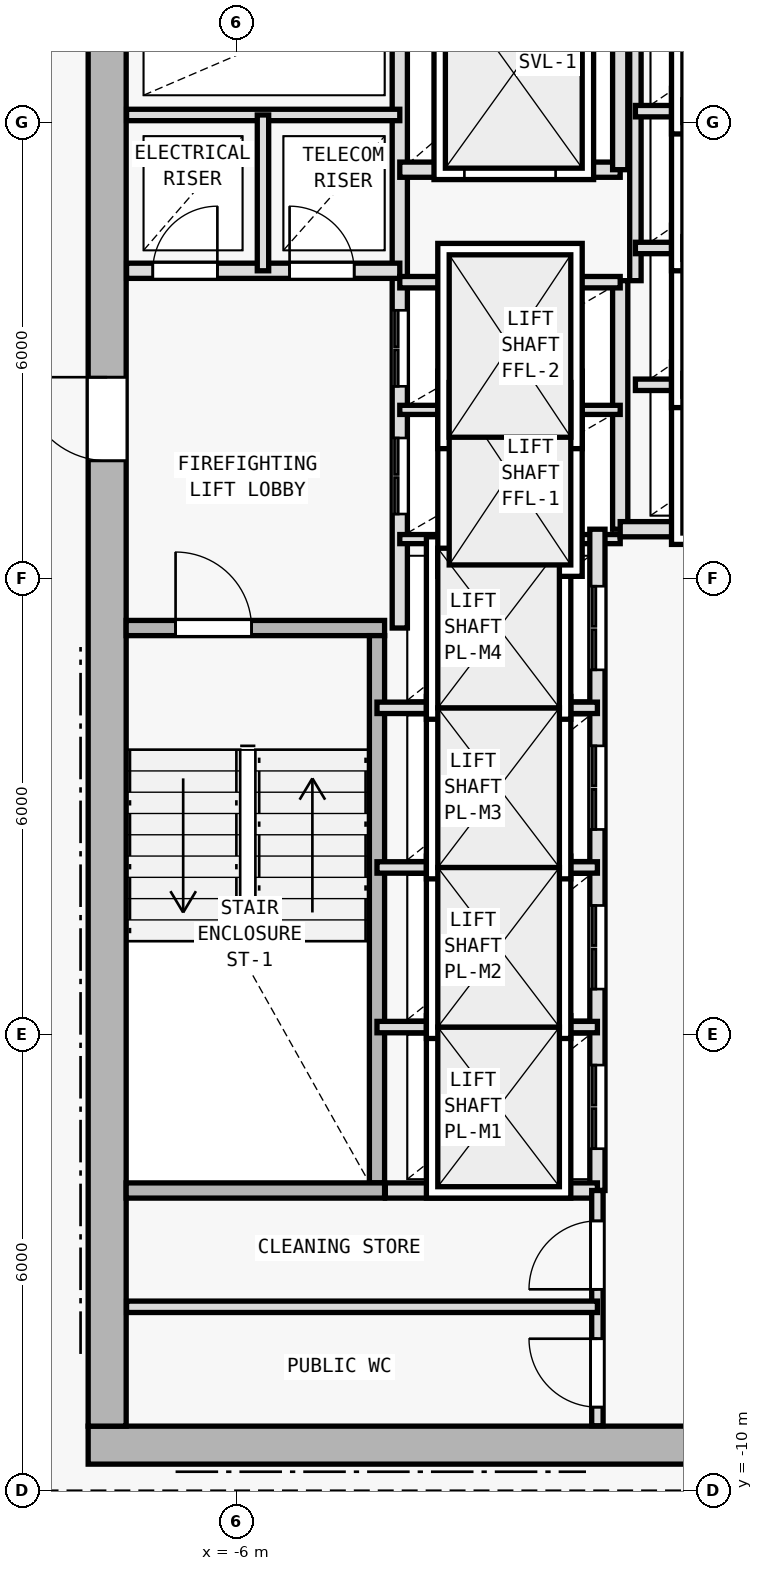
"""IFC4 building model, lengths in metres.
Left out: names, types, materials, properties, quantities, classifications, styles, units other than length and angle.
Written with IfcOpenShell. Run it as: python <this file> out.ifc"""

import sys

from ifc_helpers import new_model, si_unit, direction, frame, frame_2d, origin, origin_2d, place, context, subcontext, project, spatial, rectangle, i_section, extrude, element, fill, save


model = new_model("IFC4")
c1 = context("Model", 3, precision=1e-05, world=origin(), true_north=direction((0.0, 1.0)))
c2 = subcontext(c1, "Body", "Model", "MODEL_VIEW")
j1 = project(units=[si_unit("LENGTHUNIT", "METRE"), si_unit("PLANEANGLEUNIT", "RADIAN")], contexts=[c1])
p1 = place(None, origin())
s1 = spatial("IfcSite", under=j1, at=p1, CompositionType="ELEMENT")
p2 = place(p1, origin())
s2 = spatial("IfcBuilding", under=s1, at=p2, CompositionType="ELEMENT")
p3 = place(p2, frame((0.0, 0.0, 205.5)))
s3 = spatial("IfcBuildingStorey", under=s2, at=p3, CompositionType="ELEMENT", Elevation=205.5)
for number, where, z_axis, x_axis in (
    (1, (-7.7, -9.4, 0.0), (0.0, 0.0, 1.0), (1.0, 0.0, 0.0)),
    (2, (0.0, -9.4, 0.0), (0.0, 0.0, 1.0), (1.0, 0.0, 0.0)),
    (3, (-7.7, 2.0, 0.0), (0.0, 0.0, 1.0), (1.0, 0.0, 0.0)),
):
    element("IfcColumn", number, at=place(p3, frame(where, z_axis=z_axis, x_axis=x_axis)), inside=s3, PredefinedType="COLUMN", context=c2, shape_type="SweptSolid", body=[
        extrude(i_section(OverallWidth=0.398, OverallDepth=0.387, WebThickness=0.013, FlangeThickness=0.022, FilletRadius=0.015, at=origin_2d()), origin(), (0.0, 0.0, 1.0), 3.6),
    ])
p4 = place(p3, frame((-7.95, -9.4, 0.0), z_axis=(0.0, 0.0, 1.0), x_axis=(1.0, 0.0, 0.0)))
e4 = element("IfcWall", 4, at=p4, inside=s3, PredefinedType="SHEAR", context=c2, shape_type="SweptSolid", body=[
    extrude(rectangle(XDim=15.9, YDim=0.5, at=frame_2d((7.95, 0.0))), origin(), (0.0, 0.0, 1.0), 3.35),
])
p5 = place(p4, frame((9.6, 0.0, 0.0)))
e5 = element("IfcOpeningElement", 5, at=p5, cuts=e4, PredefinedType="OPENING", context=c2, shape_type="SweptSolid", body=[
    extrude(rectangle(XDim=1.5, YDim=2.2, at=frame_2d((0.75, 1.1))), frame((0.0, 0.26, 0.0), z_axis=(0.0, -1.0, 0.0), x_axis=(1.0, 0.0, 0.0)), (0.0, 0.0, 1.0), 0.52),
])
p6 = place(p3, frame((-7.7, -9.15, 0.0), z_axis=(0.0, 0.0, 1.0), x_axis=(0.0, 1.0, 0.0)))
e6 = element("IfcWall", 6, at=p6, inside=s3, PredefinedType="SHEAR", context=c2, shape_type="SweptSolid", body=[
    extrude(rectangle(XDim=19.1, YDim=0.5, at=frame_2d((9.55, 0.0))), origin(), (0.0, 0.0, 1.0), 3.35),
])
p7 = place(p6, frame((12.7, 0.0, 0.0)))
e7 = element("IfcOpeningElement", 7, at=p7, cuts=e6, PredefinedType="OPENING", context=c2, shape_type="SweptSolid", body=[
    extrude(rectangle(XDim=1.1, YDim=2.15, at=frame_2d((0.55, 1.075))), frame((0.0, 0.26, 0.0), z_axis=(0.0, -1.0, 0.0), x_axis=(1.0, 0.0, 0.0)), (0.0, 0.0, 1.0), 0.52),
])
p8 = place(p3, frame((-7.45, 1.35, 0.0), z_axis=(0.0, 0.0, 1.0), x_axis=(1.0, 0.0, 0.0)))
e8 = element("IfcWall", 8, at=p8, inside=s3, PredefinedType="SOLIDWALL", context=c2, shape_type="SweptSolid", body=[
    extrude(rectangle(XDim=3.4, YDim=0.2, at=frame_2d((1.7, 0.0))), origin(), (0.0, 0.0, 1.0), 3.35),
])
p9 = place(p8, frame((0.65, 0.0, 0.0)))
e9 = element("IfcOpeningElement", 9, at=p9, cuts=e8, PredefinedType="OPENING", context=c2, shape_type="SweptSolid", body=[
    extrude(rectangle(XDim=1.0, YDim=2.15, at=frame_2d((0.5, 1.075))), frame((0.0, 0.11, 0.0), z_axis=(0.0, -1.0, 0.0), x_axis=(1.0, 0.0, 0.0)), (0.0, 0.0, 1.0), 0.22),
])
p10 = place(p3, frame((-4.15, -5.95, 0.0), z_axis=(0.0, 0.0, 1.0), x_axis=(0.0, 1.0, 0.0)))
e10 = element("IfcWall", 10, at=p10, inside=s3, PredefinedType="SOLIDWALL", context=c2, shape_type="SweptSolid", body=[
    extrude(rectangle(XDim=7.2, YDim=0.2, at=frame_2d((3.6, 0.0))), origin(), (0.0, 0.0, 1.0), 3.35),
])
p11 = place(p3, frame((-3.85, 1.35, 0.0), z_axis=(0.0, 0.0, 1.0), x_axis=(0.0, 1.0, 0.0)))
e11 = element("IfcWall", 11, at=p11, inside=s3, PredefinedType="SOLIDWALL", context=c2, shape_type="SweptSolid", body=[
    extrude(rectangle(XDim=8.595, YDim=0.2, at=frame_2d((4.297, 0.0))), origin(), (0.0, 0.0, 1.0), 3.35),
])
p12 = place(p11, frame((1.5, 0.0, 0.0)))
e12 = element("IfcOpeningElement", 12, at=p12, cuts=e11, PredefinedType="OPENING", context=c2, shape_type="SweptSolid", body=[
    extrude(rectangle(XDim=1.0, YDim=2.15, at=frame_2d((0.5, 1.075))), frame((0.0, 0.11, 0.0), z_axis=(0.0, -1.0, 0.0), x_axis=(1.0, 0.0, 0.0)), (0.0, 0.0, 1.0), 0.22),
])
p13 = place(p11, frame((3.18, 0.0, 0.0)))
e13 = element("IfcOpeningElement", 13, at=p13, cuts=e11, PredefinedType="OPENING", context=c2, shape_type="SweptSolid", body=[
    extrude(rectangle(XDim=1.0, YDim=2.15, at=frame_2d((0.5, 1.075))), frame((0.0, 0.11, 0.0), z_axis=(0.0, -1.0, 0.0), x_axis=(1.0, 0.0, 0.0)), (0.0, 0.0, 1.0), 0.22),
])
p14 = place(p3, frame((-7.445, 6.05, 0.0), z_axis=(0.0, 0.0, 1.0), x_axis=(1.0, 0.0, 0.0)))
e14 = element("IfcWall", 14, at=p14, inside=s3, PredefinedType="SOLIDWALL", context=c2, shape_type="SweptSolid", body=[
    extrude(rectangle(XDim=3.595, YDim=0.2, at=frame_2d((1.797, 0.0))), origin(), (0.0, 0.0, 1.0), 3.35),
])
p15 = place(p14, frame((0.345, 0.0, 0.0)))
e15 = element("IfcOpeningElement", 15, at=p15, cuts=e14, PredefinedType="OPENING", context=c2, shape_type="SweptSolid", body=[
    extrude(rectangle(XDim=0.85, YDim=2.1, at=frame_2d((0.425, 1.05))), frame((0.0, 0.11, 0.0), z_axis=(0.0, -1.0, 0.0), x_axis=(1.0, 0.0, 0.0)), (0.0, 0.0, 1.0), 0.22),
])
p16 = place(p14, frame((2.145, 0.0, 0.0)))
e16 = element("IfcOpeningElement", 16, at=p16, cuts=e14, PredefinedType="OPENING", context=c2, shape_type="SweptSolid", body=[
    extrude(rectangle(XDim=0.85, YDim=2.1, at=frame_2d((0.425, 1.05))), frame((0.0, 0.11, 0.0), z_axis=(0.0, -1.0, 0.0), x_axis=(1.0, 0.0, 0.0)), (0.0, 0.0, 1.0), 0.22),
])
p17 = place(p3, frame((-7.445, 8.1, 0.0), z_axis=(0.0, 0.0, 1.0), x_axis=(1.0, 0.0, 0.0)))
e17 = element("IfcWall", 17, at=p17, inside=s3, PredefinedType="PARTITIONING", context=c2, shape_type="SweptSolid", body=[
    extrude(rectangle(XDim=3.595, YDim=0.15, at=frame_2d((1.797, 0.0))), origin(), (0.0, 0.0, 1.0), 3.35),
])
p18 = place(p3, frame((-5.65, 6.05, 0.0), z_axis=(0.0, 0.0, 1.0), x_axis=(0.0, 1.0, 0.0)))
e18 = element("IfcWall", 18, at=p18, inside=s3, PredefinedType="PARTITIONING", context=c2, shape_type="SweptSolid", body=[
    extrude(rectangle(XDim=2.05, YDim=0.15, at=frame_2d((1.025, 0.0))), origin(), (0.0, 0.0, 1.0), 3.35),
])
p19 = place(p3, frame((-0.95, 2.65, 0.0), z_axis=(0.0, 0.0, 1.0), x_axis=(0.0, 1.0, 0.0)))
e19 = element("IfcWall", 19, at=p19, inside=s3, PredefinedType="SOLIDWALL", context=c2, shape_type="SweptSolid", body=[
    extrude(rectangle(XDim=3.27, YDim=0.2, at=frame_2d((1.635, 0.0))), origin(), (0.0, 0.0, 1.0), 3.35),
])
for number, where, z_axis, x_axis in (
    (20, (-3.85, 2.52, 0.0), (0.0, 0.0, 1.0), (1.0, 0.0, 0.0)),
    (21, (-3.85, 4.22, 0.0), (0.0, 0.0, 1.0), (1.0, 0.0, 0.0)),
):
    element("IfcWall", number, at=place(p3, frame(where, z_axis=z_axis, x_axis=x_axis)), inside=s3, PredefinedType="PARTITIONING", context=c2, shape_type="SweptSolid", body=[
        extrude(rectangle(XDim=2.9, YDim=0.12, at=frame_2d((1.45, 0.0))), origin(), (0.0, 0.0, 1.0), 3.35),
    ])
p20 = place(p3, frame((-3.85, 5.9, 0.0), z_axis=(0.0, 0.0, 1.0), x_axis=(1.0, 0.0, 0.0)))
e22 = element("IfcWall", 22, at=p20, inside=s3, PredefinedType="PARTITIONING", context=c2, shape_type="SweptSolid", body=[
    extrude(rectangle(XDim=2.9, YDim=0.15, at=frame_2d((1.45, 0.0))), origin(), (0.0, 0.0, 1.0), 3.35),
])
p21 = place(p3, frame((-3.85, 7.38, 0.0), z_axis=(0.0, 0.0, 1.0), x_axis=(1.0, 0.0, 0.0)))
e23 = element("IfcWall", 23, at=p21, inside=s3, PredefinedType="SOLIDWALL", context=c2, shape_type="SweptSolid", body=[
    extrude(rectangle(XDim=2.9, YDim=0.2, at=frame_2d((1.45, 0.0))), origin(), (0.0, 0.0, 1.0), 3.35),
])
p22 = place(p21, frame((0.85, 0.0, 0.0)))
e24 = element("IfcOpeningElement", 24, at=p22, cuts=e23, PredefinedType="OPENING", context=c2, shape_type="SweptSolid", body=[
    extrude(rectangle(XDim=1.2, YDim=2.2, at=frame_2d((0.6, 1.1))), frame((0.0, 0.11, 0.0), z_axis=(0.0, -1.0, 0.0), x_axis=(1.0, 0.0, 0.0)), (0.0, 0.0, 1.0), 0.22),
])
p23 = place(p3, frame((-0.95, 7.38, 0.0), z_axis=(0.0, 0.0, 1.0), x_axis=(0.0, 1.0, 0.0)))
e25 = element("IfcWall", 25, at=p23, inside=s3, PredefinedType="SOLIDWALL", context=c2, shape_type="SweptSolid", body=[
    extrude(rectangle(XDim=2.565, YDim=0.2, at=frame_2d((1.283, 0.0))), origin(), (0.0, 0.0, 1.0), 3.35),
])
p24 = place(p3, frame((-1.25, -6.05, 0.0), z_axis=(0.0, 0.0, 1.0), x_axis=(0.0, 1.0, 0.0)))
e26 = element("IfcWall", 26, at=p24, inside=s3, PredefinedType="SOLIDWALL", context=c2, shape_type="SweptSolid", body=[
    extrude(rectangle(XDim=8.7, YDim=0.2, at=frame_2d((4.35, 0.0))), origin(), (0.0, 0.0, 1.0), 3.35),
])
p25 = place(p24, frame((0.55, 0.0, 0.0)))
e27 = element("IfcOpeningElement", 27, at=p25, cuts=e26, PredefinedType="OPENING", context=c2, shape_type="SweptSolid", body=[
    extrude(rectangle(XDim=1.1, YDim=2.15, at=frame_2d((0.55, 1.075))), frame((0.0, 0.11, 0.0), z_axis=(0.0, -1.0, 0.0), x_axis=(1.0, 0.0, 0.0)), (0.0, 0.0, 1.0), 0.22),
])
p26 = place(p24, frame((2.65, 0.0, 0.0)))
e28 = element("IfcOpeningElement", 28, at=p26, cuts=e26, PredefinedType="OPENING", context=c2, shape_type="SweptSolid", body=[
    extrude(rectangle(XDim=1.1, YDim=2.15, at=frame_2d((0.55, 1.075))), frame((0.0, 0.11, 0.0), z_axis=(0.0, -1.0, 0.0), x_axis=(1.0, 0.0, 0.0)), (0.0, 0.0, 1.0), 0.22),
])
p27 = place(p24, frame((4.75, 0.0, 0.0)))
e29 = element("IfcOpeningElement", 29, at=p27, cuts=e26, PredefinedType="OPENING", context=c2, shape_type="SweptSolid", body=[
    extrude(rectangle(XDim=1.1, YDim=2.15, at=frame_2d((0.55, 1.075))), frame((0.0, 0.11, 0.0), z_axis=(0.0, -1.0, 0.0), x_axis=(1.0, 0.0, 0.0)), (0.0, 0.0, 1.0), 0.22),
])
p28 = place(p24, frame((6.85, 0.0, 0.0)))
e30 = element("IfcOpeningElement", 30, at=p28, cuts=e26, PredefinedType="OPENING", context=c2, shape_type="SweptSolid", body=[
    extrude(rectangle(XDim=1.1, YDim=2.15, at=frame_2d((0.55, 1.075))), frame((0.0, 0.11, 0.0), z_axis=(0.0, -1.0, 0.0), x_axis=(1.0, 0.0, 0.0)), (0.0, 0.0, 1.0), 0.22),
])
for number, where, z_axis, x_axis in (
    (31, (-4.15, -3.9, 0.0), (0.0, 0.0, 1.0), (1.0, 0.0, 0.0)),
    (32, (-4.15, -1.8, 0.0), (0.0, 0.0, 1.0), (1.0, 0.0, 0.0)),
    (33, (-4.15, 0.3, 0.0), (0.0, 0.0, 1.0), (1.0, 0.0, 0.0)),
):
    element("IfcWall", number, at=place(p3, frame(where, z_axis=z_axis, x_axis=x_axis)), inside=s3, PredefinedType="PARTITIONING", context=c2, shape_type="SweptSolid", body=[
        extrude(rectangle(XDim=2.9, YDim=0.15, at=frame_2d((1.45, 0.0))), origin(), (0.0, 0.0, 1.0), 3.35),
    ])
p29 = place(p3, frame((-0.95, 2.65, 0.0), z_axis=(0.0, 0.0, 1.0), x_axis=(1.0, 0.0, 0.0)))
e34 = element("IfcWall", 34, at=p29, inside=s3, PredefinedType="SOLIDWALL", context=c2, shape_type="SweptSolid", body=[
    extrude(rectangle(XDim=2.9, YDim=0.2, at=frame_2d((1.45, 0.0))), origin(), (0.0, 0.0, 1.0), 3.35),
])
p30 = place(p3, frame((-0.75, 5.92, 0.0), z_axis=(0.0, 0.0, 1.0), x_axis=(0.0, 1.0, 0.0)))
e35 = element("IfcWall", 35, at=p30, inside=s3, PredefinedType="PARTITIONING", context=c2, shape_type="SweptSolid", body=[
    extrude(rectangle(XDim=4.025, YDim=0.15, at=frame_2d((2.013, 0.0))), origin(), (0.0, 0.0, 1.0), 3.35),
])
for number, where, z_axis, x_axis in (
    (36, (-0.75, 4.55, 0.0), (0.0, 0.0, 1.0), (1.0, 0.0, 0.0)),
    (37, (-0.75, 6.35, 0.0), (0.0, 0.0, 1.0), (1.0, 0.0, 0.0)),
    (38, (-0.75, 8.15, 0.0), (0.0, 0.0, 1.0), (1.0, 0.0, 0.0)),
):
    element("IfcWall", number, at=place(p3, frame(where, z_axis=z_axis, x_axis=x_axis)), inside=s3, PredefinedType="PARTITIONING", context=c2, shape_type="SweptSolid", body=[
        extrude(rectangle(XDim=2.7, YDim=0.15, at=frame_2d((1.35, 0.0))), origin(), (0.0, 0.0, 1.0), 3.35),
    ])
p31 = place(p3, frame((-7.45, -6.05, 0.0), z_axis=(0.0, 0.0, 1.0), x_axis=(1.0, 0.0, 0.0)))
e39 = element("IfcWall", 39, at=p31, inside=s3, PredefinedType="SOLIDWALL", context=c2, shape_type="SweptSolid", body=[
    extrude(rectangle(XDim=3.4, YDim=0.2, at=frame_2d((1.7, 0.0))), origin(), (0.0, 0.0, 1.0), 3.35),
])
p32 = place(p3, frame((-4.04, -6.05, 0.0), z_axis=(0.0, 0.0, 1.0), x_axis=(1.0, 0.0, 0.0)))
e40 = element("IfcWall", 40, at=p32, inside=s3, PredefinedType="SOLIDWALL", context=c2, shape_type="SweptSolid", body=[
    extrude(rectangle(XDim=2.79, YDim=0.2, at=frame_2d((1.395, 0.0))), origin(), (0.0, 0.0, 1.0), 3.35),
])
p33 = place(p3, frame((-1.25, -9.145, 0.0), z_axis=(0.0, 0.0, 1.0), x_axis=(0.0, 1.0, 0.0)))
e41 = element("IfcWall", 41, at=p33, inside=s3, PredefinedType="PARTITIONING", context=c2, shape_type="SweptSolid", body=[
    extrude(rectangle(XDim=3.095, YDim=0.15, at=frame_2d((1.547, 0.0))), origin(), (0.0, 0.0, 1.0), 3.35),
])
p34 = place(p33, frame((1.795, 0.0, 0.0)))
e42 = element("IfcOpeningElement", 42, at=p34, cuts=e41, PredefinedType="OPENING", context=c2, shape_type="SweptSolid", body=[
    extrude(rectangle(XDim=0.9, YDim=2.1, at=frame_2d((0.45, 1.05))), frame((0.0, 0.085, 0.0), z_axis=(0.0, -1.0, 0.0), x_axis=(1.0, 0.0, 0.0)), (0.0, 0.0, 1.0), 0.17),
])
p35 = place(p33, frame((0.245, 0.0, 0.0)))
e43 = element("IfcOpeningElement", 43, at=p35, cuts=e41, PredefinedType="OPENING", context=c2, shape_type="SweptSolid", body=[
    extrude(rectangle(XDim=0.9, YDim=2.1, at=frame_2d((0.45, 1.05))), frame((0.0, 0.085, 0.0), z_axis=(0.0, -1.0, 0.0), x_axis=(1.0, 0.0, 0.0)), (0.0, 0.0, 1.0), 0.17),
])
p36 = place(p3, frame((-7.445, -7.58, 0.0), z_axis=(0.0, 0.0, 1.0), x_axis=(1.0, 0.0, 0.0)))
e44 = element("IfcWall", 44, at=p36, inside=s3, PredefinedType="PARTITIONING", context=c2, shape_type="SweptSolid", body=[
    extrude(rectangle(XDim=6.195, YDim=0.15, at=frame_2d((3.098, 0.0))), origin(), (0.0, 0.0, 1.0), 3.35),
])
p37 = place(p3, frame((-9.86, 8.426, 0.0), z_axis=(0.0, 0.0, 1.0), x_axis=(0.582449511476, 0.812866881218, 0.0)))
e45 = element("IfcWall", 45, at=p37, inside=s3, PredefinedType="PARTITIONING", context=c2, shape_type="SweptSolid", body=[
    extrude(rectangle(XDim=4.84, YDim=0.15, at=frame_2d((2.42, 0.0))), origin(), (0.0, 0.0, 1.0), 2.975),
])
p38 = place(p7, origin())
e46 = element("IfcDoor", 46, at=p38, inside=s3, OperationType="SINGLE_SWING_RIGHT", PredefinedType="DOOR", context=c2, shape_type="SweptSolid", body=[
    extrude(rectangle(XDim=1.1, YDim=2.15, at=frame_2d((0.55, 1.075))), frame((0.0, 0.025, 0.0), z_axis=(0.0, -1.0, 0.0), x_axis=(1.0, 0.0, 0.0)), (0.0, 0.0, 1.0), 0.05),
])
fill(e7, e46)
p39 = place(p9, origin())
e47 = element("IfcDoor", 47, at=p39, inside=s3, OperationType="SINGLE_SWING_LEFT", PredefinedType="DOOR", context=c2, shape_type="SweptSolid", body=[
    extrude(rectangle(XDim=1.0, YDim=2.15, at=frame_2d((0.5, 1.075))), frame((0.0, 0.025, 0.0), z_axis=(0.0, -1.0, 0.0), x_axis=(1.0, 0.0, 0.0)), (0.0, 0.0, 1.0), 0.05),
])
fill(e9, e47)
p40 = place(p15, origin())
e48 = element("IfcDoor", 48, at=p40, inside=s3, OperationType="SINGLE_SWING_RIGHT", PredefinedType="DOOR", context=c2, shape_type="SweptSolid", body=[
    extrude(rectangle(XDim=0.85, YDim=2.1, at=frame_2d((0.425, 1.05))), frame((0.0, 0.025, 0.0), z_axis=(0.0, -1.0, 0.0), x_axis=(1.0, 0.0, 0.0)), (0.0, 0.0, 1.0), 0.05),
])
fill(e15, e48)
p41 = place(p16, origin())
e49 = element("IfcDoor", 49, at=p41, inside=s3, OperationType="SINGLE_SWING_LEFT", PredefinedType="DOOR", context=c2, shape_type="SweptSolid", body=[
    extrude(rectangle(XDim=0.85, YDim=2.1, at=frame_2d((0.425, 1.05))), frame((0.0, 0.025, 0.0), z_axis=(0.0, -1.0, 0.0), x_axis=(1.0, 0.0, 0.0)), (0.0, 0.0, 1.0), 0.05),
])
fill(e16, e49)
p42 = place(p22, origin())
e50 = element("IfcDoor", 50, at=p42, inside=s3, OperationType="DOUBLE_DOOR_SLIDING", PredefinedType="DOOR", context=c2, shape_type="SweptSolid", body=[
    extrude(rectangle(XDim=1.2, YDim=2.2, at=frame_2d((0.6, 1.1))), frame((0.0, 0.025, 0.0), z_axis=(0.0, -1.0, 0.0), x_axis=(1.0, 0.0, 0.0)), (0.0, 0.0, 1.0), 0.05),
])
fill(e24, e50)
p43 = place(p25, origin())
e51 = element("IfcDoor", 51, at=p43, inside=s3, OperationType="DOUBLE_DOOR_SLIDING", PredefinedType="DOOR", context=c2, shape_type="SweptSolid", body=[
    extrude(rectangle(XDim=1.1, YDim=2.15, at=frame_2d((0.55, 1.075))), frame((0.0, 0.025, 0.0), z_axis=(0.0, -1.0, 0.0), x_axis=(1.0, 0.0, 0.0)), (0.0, 0.0, 1.0), 0.05),
])
fill(e27, e51)
p44 = place(p26, origin())
e52 = element("IfcDoor", 52, at=p44, inside=s3, OperationType="DOUBLE_DOOR_SLIDING", PredefinedType="DOOR", context=c2, shape_type="SweptSolid", body=[
    extrude(rectangle(XDim=1.1, YDim=2.15, at=frame_2d((0.55, 1.075))), frame((0.0, 0.025, 0.0), z_axis=(0.0, -1.0, 0.0), x_axis=(1.0, 0.0, 0.0)), (0.0, 0.0, 1.0), 0.05),
])
fill(e28, e52)
p45 = place(p27, origin())
e53 = element("IfcDoor", 53, at=p45, inside=s3, OperationType="DOUBLE_DOOR_SLIDING", PredefinedType="DOOR", context=c2, shape_type="SweptSolid", body=[
    extrude(rectangle(XDim=1.1, YDim=2.15, at=frame_2d((0.55, 1.075))), frame((0.0, 0.025, 0.0), z_axis=(0.0, -1.0, 0.0), x_axis=(1.0, 0.0, 0.0)), (0.0, 0.0, 1.0), 0.05),
])
fill(e29, e53)
p46 = place(p28, origin())
e54 = element("IfcDoor", 54, at=p46, inside=s3, OperationType="DOUBLE_DOOR_SLIDING", PredefinedType="DOOR", context=c2, shape_type="SweptSolid", body=[
    extrude(rectangle(XDim=1.1, YDim=2.15, at=frame_2d((0.55, 1.075))), frame((0.0, 0.025, 0.0), z_axis=(0.0, -1.0, 0.0), x_axis=(1.0, 0.0, 0.0)), (0.0, 0.0, 1.0), 0.05),
])
fill(e30, e54)
p47 = place(p12, origin())
e55 = element("IfcDoor", 55, at=p47, inside=s3, OperationType="DOUBLE_DOOR_SLIDING", PredefinedType="DOOR", context=c2, shape_type="SweptSolid", body=[
    extrude(rectangle(XDim=1.0, YDim=2.15, at=frame_2d((0.5, 1.075))), frame((0.0, 0.025, 0.0), z_axis=(0.0, -1.0, 0.0), x_axis=(1.0, 0.0, 0.0)), (0.0, 0.0, 1.0), 0.05),
])
fill(e12, e55)
p48 = place(p13, origin())
e56 = element("IfcDoor", 56, at=p48, inside=s3, OperationType="DOUBLE_DOOR_SLIDING", PredefinedType="DOOR", context=c2, shape_type="SweptSolid", body=[
    extrude(rectangle(XDim=1.0, YDim=2.15, at=frame_2d((0.5, 1.075))), frame((0.0, 0.025, 0.0), z_axis=(0.0, -1.0, 0.0), x_axis=(1.0, 0.0, 0.0)), (0.0, 0.0, 1.0), 0.05),
])
fill(e13, e56)
p49 = place(p34, origin())
e57 = element("IfcDoor", 57, at=p49, inside=s3, OperationType="SINGLE_SWING_LEFT", PredefinedType="DOOR", context=c2, shape_type="SweptSolid", body=[
    extrude(rectangle(XDim=0.9, YDim=2.1, at=frame_2d((0.45, 1.05))), frame((0.0, 0.025, 0.0), z_axis=(0.0, -1.0, 0.0), x_axis=(1.0, 0.0, 0.0)), (0.0, 0.0, 1.0), 0.05),
])
fill(e42, e57)
p50 = place(p35, origin())
e58 = element("IfcDoor", 58, at=p50, inside=s3, OperationType="SINGLE_SWING_RIGHT", PredefinedType="DOOR", context=c2, shape_type="SweptSolid", body=[
    extrude(rectangle(XDim=0.9, YDim=2.1, at=frame_2d((0.45, 1.05))), frame((0.0, 0.025, 0.0), z_axis=(0.0, -1.0, 0.0), x_axis=(1.0, 0.0, 0.0)), (0.0, 0.0, 1.0), 0.05),
])
fill(e43, e58)
save(model, sys.argv[1])
